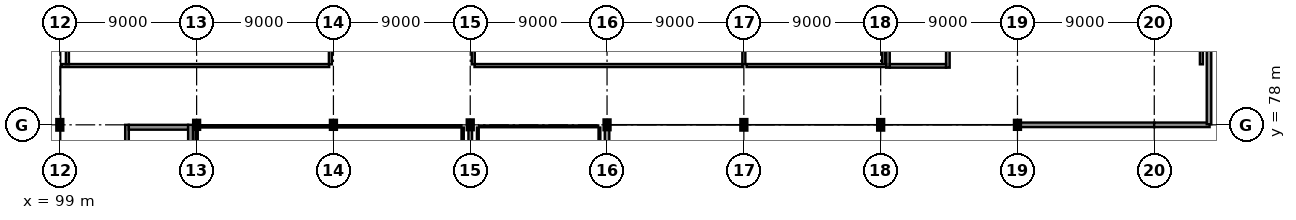
"""IFC4 building model, lengths in metres.
Left out: names, types, materials, properties, quantities, classifications, styles, units other than length and angle.
Written with IfcOpenShell. Run it as: python <this file> out.ifc"""

import sys

from ifc_helpers import new_model, si_unit, direction, frame, frame_2d, origin, origin_2d, place, context, subcontext, project, spatial, rectangle, i_section, extrude, element, fill, save


model = new_model("IFC4")
c1 = context("Model", 3, precision=1e-05, world=origin(), true_north=direction((0.0, 1.0)))
c2 = subcontext(c1, "Body", "Model", "MODEL_VIEW")
j1 = project(units=[si_unit("LENGTHUNIT", "METRE"), si_unit("PLANEANGLEUNIT", "RADIAN")], contexts=[c1])
p1 = place(None, origin())
s1 = spatial("IfcSite", under=j1, at=p1, CompositionType="ELEMENT")
p2 = place(p1, origin())
s2 = spatial("IfcBuilding", under=s1, at=p2, CompositionType="ELEMENT")
p3 = place(p2, frame((0.0, 0.0, 9.9)))
s3 = spatial("IfcBuildingStorey", under=s2, at=p3, CompositionType="ELEMENT", Elevation=9.9)
p4 = place(p3, frame((99.0, 78.0, 0.0), z_axis=(0.0, 0.0, 1.0), x_axis=(1.0, 0.0, 0.0)))
e1 = element("IfcColumn", 1, at=p4, inside=s3, PredefinedType="COLUMN", context=c2, shape_type="SweptSolid", body=[
    extrude(i_section(OverallWidth=0.3, OverallDepth=0.6, WebThickness=0.015, FlangeThickness=0.03, at=origin_2d()), origin(), (0.0, 0.0, 1.0), 4.5),
])
for number, where, z_axis, x_axis in (
    (2, (108.0, 78.0, 0.0), (0.0, 0.0, 1.0), (0.0, 1.0, 0.0)),
    (3, (117.0, 78.0, 0.0), (0.0, 0.0, 1.0), (1.0, 0.0, 0.0)),
):
    element("IfcColumn", number, at=place(p3, frame(where, z_axis=z_axis, x_axis=x_axis)), inside=s3, PredefinedType="COLUMN", context=c2, shape_type="SweptSolid", body=[
        extrude(i_section(OverallWidth=0.3, OverallDepth=0.5, WebThickness=0.014, FlangeThickness=0.028, at=origin_2d()), origin(), (0.0, 0.0, 1.0), 4.5),
    ])
for number, where, z_axis, x_axis in (
    (4, (126.0, 78.0, 0.0), (0.0, 0.0, 1.0), (1.0, 0.0, 0.0)),
    (5, (135.0, 78.0, 0.0), (0.0, 0.0, 1.0), (1.0, 0.0, 0.0)),
):
    element("IfcColumn", number, at=place(p3, frame(where, z_axis=z_axis, x_axis=x_axis)), inside=s3, PredefinedType="COLUMN", context=c2, shape_type="SweptSolid", body=[
        extrude(i_section(OverallWidth=0.3, OverallDepth=0.55, WebThickness=0.015, FlangeThickness=0.029, at=origin_2d()), origin(), (0.0, 0.0, 1.0), 4.5),
    ])
for number, where, z_axis, x_axis in (
    (6, (144.0, 78.0, 0.0), (0.0, 0.0, 1.0), (1.0, 0.0, 0.0)),
    (7, (153.0, 78.0, 0.0), (0.0, 0.0, 1.0), (0.0, 1.0, 0.0)),
):
    element("IfcColumn", number, at=place(p3, frame(where, z_axis=z_axis, x_axis=x_axis)), inside=s3, PredefinedType="COLUMN", context=c2, shape_type="SweptSolid", body=[
        extrude(i_section(OverallWidth=0.3, OverallDepth=0.6, WebThickness=0.015, FlangeThickness=0.03, at=origin_2d()), origin(), (0.0, 0.0, 1.0), 4.5),
    ])
p5 = place(p3, frame((162.0, 78.0, 0.0), z_axis=(0.0, 0.0, 1.0), x_axis=(1.0, 0.0, 0.0)))
e8 = element("IfcColumn", 8, at=p5, inside=s3, PredefinedType="COLUMN", context=c2, shape_type="SweptSolid", body=[
    extrude(i_section(OverallWidth=0.3, OverallDepth=0.5, WebThickness=0.014, FlangeThickness=0.028, at=origin_2d()), origin(), (0.0, 0.0, 1.0), 4.5),
])
p6 = place(p3, frame((135.0, 66.148, 0.0), z_axis=(0.0, 0.0, 1.0), x_axis=(0.0, 1.0, 0.0)))
e9 = element("IfcWall", 9, at=p6, inside=s3, PredefinedType="SOLIDWALL", context=c2, shape_type="SweptSolid", body=[
    extrude(rectangle(XDim=11.579, YDim=0.3, at=frame_2d((5.79, 0.0))), origin(), (0.0, 0.0, 1.0), 3.845),
])
p7 = place(p6, frame((2.242, 0.0, 0.8)))
e10 = element("IfcOpeningElement", 10, at=p7, cuts=e9, PredefinedType="OPENING", context=c2, shape_type="SweptSolid", body=[
    extrude(rectangle(XDim=2.0, YDim=2.0, at=frame_2d((1.0, 1.0))), frame((0.0, 0.165, 0.0), z_axis=(0.0, -1.0, 0.0), x_axis=(1.0, 0.0, 0.0)), (0.0, 0.0, 1.0), 0.33),
])
p8 = place(p6, frame((7.337, 0.0, 0.8)))
e11 = element("IfcOpeningElement", 11, at=p8, cuts=e9, PredefinedType="OPENING", context=c2, shape_type="SweptSolid", body=[
    extrude(rectangle(XDim=2.0, YDim=2.0, at=frame_2d((1.0, 1.0))), frame((0.0, 0.165, 0.0), z_axis=(0.0, -1.0, 0.0), x_axis=(1.0, 0.0, 0.0)), (0.0, 0.0, 1.0), 0.33),
])
p9 = place(p3, frame((162.008, 78.0, 0.0), z_axis=(0.0, 0.0, 1.0), x_axis=(1.0, 0.0, 0.0)))
e12 = element("IfcWall", 12, at=p9, inside=s3, PredefinedType="SOLIDWALL", context=c2, shape_type="SweptSolid", body=[
    extrude(rectangle(XDim=9.002, YDim=0.3, at=frame_2d((4.501, 0.0))), origin(), (0.0, 0.0, 1.0), 3.187),
])
p10 = place(p3, frame((170.99, 78.0, 0.0), z_axis=(0.0, 0.0, 1.0), x_axis=(1.0, 0.0, 0.0)))
e13 = element("IfcWall", 13, at=p10, inside=s3, PredefinedType="SOLIDWALL", context=c2, shape_type="SweptSolid", body=[
    extrude(rectangle(XDim=3.65, YDim=0.3, at=frame_2d((1.825, 0.0))), origin(), (0.0, 0.0, 1.0), 3.187),
])
p11 = place(p3, frame((174.6, 78.04, 0.0), z_axis=(0.0, 0.0, 1.0), x_axis=(0.0, 1.0, 0.0)))
e14 = element("IfcWall", 14, at=p11, inside=s3, PredefinedType="SOLIDWALL", context=c2, shape_type="SweptSolid", body=[
    extrude(rectangle(XDim=18.0, YDim=0.3, at=frame_2d((9.0, 0.0))), origin(), (0.0, 0.0, 1.0), 3.545),
])
p12 = place(p11, frame((4.75, 0.0, 0.9)))
e15 = element("IfcOpeningElement", 15, at=p12, cuts=e14, PredefinedType="OPENING", context=c2, shape_type="SweptSolid", body=[
    extrude(rectangle(XDim=1.3, YDim=1.3, at=frame_2d((0.65, 0.65))), frame((0.0, 0.165, 0.0), z_axis=(0.0, -1.0, 0.0), x_axis=(1.0, 0.0, 0.0)), (0.0, 0.0, 1.0), 0.33),
])
p13 = place(p11, frame((11.95, 0.0, 0.9)))
e16 = element("IfcOpeningElement", 16, at=p13, cuts=e14, PredefinedType="OPENING", context=c2, shape_type="SweptSolid", body=[
    extrude(rectangle(XDim=1.3, YDim=1.3, at=frame_2d((0.65, 0.65))), frame((0.0, 0.165, 0.0), z_axis=(0.0, -1.0, 0.0), x_axis=(1.0, 0.0, 0.0)), (0.0, 0.0, 1.0), 0.33),
])
p14 = place(p3, frame((153.48, 81.76, 0.0), z_axis=(0.0, 0.0, 1.0), x_axis=(0.0, 1.0, 0.0)))
e17 = element("IfcWall", 17, at=p14, inside=s3, PredefinedType="SHEAR", context=c2, shape_type="SweptSolid", body=[
    extrude(rectangle(XDim=8.28, YDim=0.24, at=frame_2d((4.14, 0.0))), origin(), (0.0, 0.0, 1.0), 4.31),
])
p15 = place(p3, frame((157.42, 81.76, 0.0), z_axis=(0.0, 0.0, 1.0), x_axis=(0.0, 1.0, 0.0)))
e18 = element("IfcWall", 18, at=p15, inside=s3, PredefinedType="SHEAR", context=c2, shape_type="SweptSolid", body=[
    extrude(rectangle(XDim=8.28, YDim=0.24, at=frame_2d((4.14, 0.0))), origin(), (0.0, 0.0, 1.0), 4.31),
])
p16 = place(p15, frame((0.49, 0.0, 0.0)))
e19 = element("IfcOpeningElement", 19, at=p16, cuts=e18, PredefinedType="OPENING", context=c2, shape_type="SweptSolid", body=[
    extrude(rectangle(XDim=1.3, YDim=2.2, at=frame_2d((0.65, 1.1))), frame((0.0, 0.135, 0.0), z_axis=(0.0, -1.0, 0.0), x_axis=(1.0, 0.0, 0.0)), (0.0, 0.0, 1.0), 0.27),
])
p17 = place(p3, frame((153.6, 81.88, 0.0), z_axis=(0.0, 0.0, 1.0), x_axis=(1.0, 0.0, 0.0)))
e20 = element("IfcWall", 20, at=p17, inside=s3, PredefinedType="SHEAR", context=c2, shape_type="SweptSolid", body=[
    extrude(rectangle(XDim=3.7, YDim=0.24, at=frame_2d((1.85, 0.0))), origin(), (0.0, 0.0, 1.0), 4.31),
])
p18 = place(p3, frame((103.42, 75.24, 0.0), z_axis=(0.0, 0.0, 1.0), x_axis=(0.0, 1.0, 0.0)))
e21 = element("IfcWall", 21, at=p18, inside=s3, PredefinedType="SHEAR", context=c2, shape_type="SweptSolid", body=[
    extrude(rectangle(XDim=2.76, YDim=0.24, at=frame_2d((1.38, 0.0))), origin(), (0.0, 0.0, 1.0), 4.16),
])
p19 = place(p3, frame((103.54, 77.84, 0.0), z_axis=(0.0, 0.0, 1.0), x_axis=(1.0, 0.0, 0.0)))
e22 = element("IfcWall", 22, at=p19, inside=s3, PredefinedType="SHEAR", context=c2, shape_type="SweptSolid", body=[
    extrude(rectangle(XDim=3.9, YDim=0.32, at=frame_2d((1.95, 0.0))), origin(), (0.0, 0.0, 1.0), 4.16),
])
p20 = place(p19, frame((1.225, 0.0, 0.0)))
e23 = element("IfcOpeningElement", 23, at=p20, cuts=e22, PredefinedType="OPENING", context=c2, shape_type="SweptSolid", body=[
    extrude(rectangle(XDim=1.45, YDim=2.2, at=frame_2d((0.725, 1.1))), frame((0.0, 0.175, 0.0), z_axis=(0.0, -1.0, 0.0), x_axis=(1.0, 0.0, 0.0)), (0.0, 0.0, 1.0), 0.35),
])
p21 = place(p3, frame((107.6, 68.96, 0.0), z_axis=(0.0, 0.0, 1.0), x_axis=(0.0, 1.0, 0.0)))
e24 = element("IfcWall", 24, at=p21, inside=s3, PredefinedType="SHEAR", context=c2, shape_type="SweptSolid", body=[
    extrude(rectangle(XDim=9.04, YDim=0.32, at=frame_2d((4.52, 0.0))), origin(), (0.0, 0.0, 1.0), 4.16),
])
p22 = place(p3, frame((126.0, 66.008, 0.0), z_axis=(0.0, 0.0, 1.0), x_axis=(0.0, 1.0, 0.0)))
e25 = element("IfcWall", 25, at=p22, inside=s3, PredefinedType="SHEAR", context=c2, shape_type="SweptSolid", body=[
    extrude(rectangle(XDim=11.719, YDim=0.24, at=frame_2d((5.859, 0.0))), origin(), (0.0, 0.0, 1.0), 3.595),
])
p23 = place(p3, frame((116.72, 81.9, 0.0), z_axis=(0.0, 0.0, 1.0), x_axis=(-1.0, 0.0, 0.0)))
e26 = element("IfcWall", 26, at=p23, inside=s3, PredefinedType="PARTITIONING", context=c2, shape_type="SweptSolid", body=[
    extrude(rectangle(XDim=17.595, YDim=0.2, at=frame_2d((8.797, 0.0))), origin(), (0.0, 0.0, 1.0), 4.14),
])
p24 = place(p23, frame((7.797, 0.0, 0.0)))
e27 = element("IfcOpeningElement", 27, at=p24, cuts=e26, PredefinedType="OPENING", context=c2, shape_type="SweptSolid", body=[
    extrude(rectangle(XDim=2.0, YDim=2.6, at=frame_2d((1.0, 1.3))), frame((0.0, 0.115, 0.0), z_axis=(0.0, -1.0, 0.0), x_axis=(1.0, 0.0, 0.0)), (0.0, 0.0, 1.0), 0.23),
])
p25 = place(p3, frame((99.5, 81.98, 0.0), z_axis=(0.0, 0.0, 1.0), x_axis=(0.0, 1.0, 0.0)))
e28 = element("IfcWall", 28, at=p25, inside=s3, PredefinedType="PARTITIONING", context=c2, shape_type="SweptSolid", body=[
    extrude(rectangle(XDim=13.875, YDim=0.2, at=frame_2d((6.938, 0.0))), origin(), (0.0, 0.0, 1.0), 4.14),
])
p26 = place(p3, frame((116.8, 95.752, 0.0), z_axis=(0.0, 0.0, 1.0), x_axis=(0.0, -1.0, 0.0)))
e29 = element("IfcWall", 29, at=p26, inside=s3, PredefinedType="PARTITIONING", context=c2, shape_type="SweptSolid", body=[
    extrude(rectangle(XDim=13.772, YDim=0.2, at=frame_2d((6.886, 0.0))), origin(), (0.0, 0.0, 1.0), 3.495),
])
p27 = place(p3, frame((126.2, 81.98, 0.0), z_axis=(0.0, 0.0, 1.0), x_axis=(0.0, 1.0, 0.0)))
e30 = element("IfcWall", 30, at=p27, inside=s3, PredefinedType="PARTITIONING", context=c2, shape_type="SweptSolid", body=[
    extrude(rectangle(XDim=13.44, YDim=0.2, at=frame_2d((6.72, 0.0))), origin(), (0.0, 0.0, 1.0), 3.505),
])
p28 = place(p3, frame((144.0, 95.42, 0.0), z_axis=(0.0, 0.0, 1.0), x_axis=(0.0, -1.0, 0.0)))
e31 = element("IfcWall", 31, at=p28, inside=s3, PredefinedType="PARTITIONING", context=c2, shape_type="SweptSolid", body=[
    extrude(rectangle(XDim=13.44, YDim=0.2, at=frame_2d((6.72, 0.0))), origin(), (0.0, 0.0, 1.0), 3.395),
])
p29 = place(p3, frame((143.92, 81.9, 0.0), z_axis=(0.0, 0.0, 1.0), x_axis=(-1.0, 0.0, 0.0)))
e32 = element("IfcWall", 32, at=p29, inside=s3, PredefinedType="PARTITIONING", context=c2, shape_type="SweptSolid", body=[
    extrude(rectangle(XDim=17.64, YDim=0.2, at=frame_2d((8.82, 0.0))), origin(), (0.0, 0.0, 1.0), 4.14),
])
p30 = place(p29, frame((7.87, 0.0, 0.0)))
e33 = element("IfcOpeningElement", 33, at=p30, cuts=e32, PredefinedType="OPENING", context=c2, shape_type="SweptSolid", body=[
    extrude(rectangle(XDim=1.9, YDim=2.5, at=frame_2d((0.95, 1.25))), frame((0.0, 0.115, 0.0), z_axis=(0.0, -1.0, 0.0), x_axis=(1.0, 0.0, 0.0)), (0.0, 0.0, 1.0), 0.23),
])
p31 = place(p3, frame((153.2, 95.702, 0.0), z_axis=(0.0, 0.0, 1.0), x_axis=(0.0, -1.0, 0.0)))
e34 = element("IfcWall", 34, at=p31, inside=s3, PredefinedType="PARTITIONING", context=c2, shape_type="SweptSolid", body=[
    extrude(rectangle(XDim=13.722, YDim=0.2, at=frame_2d((6.861, 0.0))), origin(), (0.0, 0.0, 1.0), 3.545),
])
p32 = place(p3, frame((153.365, 81.9, 0.0), z_axis=(0.0, 0.0, 1.0), x_axis=(-1.0, 0.0, 0.0)))
e35 = element("IfcWall", 35, at=p32, inside=s3, PredefinedType="PARTITIONING", context=c2, shape_type="SweptSolid", body=[
    extrude(rectangle(XDim=9.185, YDim=0.2, at=frame_2d((4.593, 0.0))), origin(), (0.0, 0.0, 1.0), 4.14),
])
p33 = place(p32, frame((3.693, 0.0, 0.0)))
e36 = element("IfcOpeningElement", 36, at=p33, cuts=e35, PredefinedType="OPENING", context=c2, shape_type="SweptSolid", body=[
    extrude(rectangle(XDim=1.8, YDim=2.45, at=frame_2d((0.9, 1.225))), frame((0.0, 0.115, 0.0), z_axis=(0.0, -1.0, 0.0), x_axis=(1.0, 0.0, 0.0)), (0.0, 0.0, 1.0), 0.23),
])
p34 = place(p3, frame((174.1, 95.855, 0.0), z_axis=(0.0, 0.0, 1.0), x_axis=(0.0, -1.0, 0.0)))
e37 = element("IfcWall", 37, at=p34, inside=s3, PredefinedType="PARTITIONING", context=c2, shape_type="SweptSolid", body=[
    extrude(rectangle(XDim=13.875, YDim=0.2, at=frame_2d((6.938, 0.0))), origin(), (0.0, 0.0, 1.0), 4.14),
])
p35 = place(p3, frame((108.0, 66.48, 0.0), z_axis=(0.0, 0.0, 1.0), x_axis=(0.0, 1.0, 0.0)))
e38 = element("IfcWall", 38, at=p35, inside=s3, PredefinedType="PARTITIONING", context=c2, shape_type="SweptSolid", body=[
    extrude(rectangle(XDim=11.34, YDim=0.15, at=frame_2d((5.67, 0.0))), origin(), (0.0, 0.0, 1.0), 3.705),
])
p36 = place(p3, frame((107.848, 77.9, 0.0), z_axis=(0.0, 0.0, 1.0), x_axis=(1.0, 0.0, 0.0)))
e39 = element("IfcWall", 39, at=p36, inside=s3, PredefinedType="PARTITIONING", context=c2, shape_type="SweptSolid", body=[
    extrude(rectangle(XDim=17.572, YDim=0.15, at=frame_2d((8.786, 0.0))), origin(), (0.0, 0.0, 1.0), 3.705),
])
p37 = place(p36, frame((7.558, 0.0, 0.0)))
e40 = element("IfcOpeningElement", 40, at=p37, cuts=e39, PredefinedType="OPENING", context=c2, shape_type="SweptSolid", body=[
    extrude(rectangle(XDim=1.05, YDim=2.25, at=frame_2d((0.525, 1.125))), frame((0.0, 0.09, 0.0), z_axis=(0.0, -1.0, 0.0), x_axis=(1.0, 0.0, 0.0)), (0.0, 0.0, 1.0), 0.18),
])
p38 = place(p3, frame((125.5, 77.82, 0.0), z_axis=(0.0, 0.0, 1.0), x_axis=(0.0, -1.0, 0.0)))
e41 = element("IfcWall", 41, at=p38, inside=s3, PredefinedType="PARTITIONING", context=c2, shape_type="SweptSolid", body=[
    extrude(rectangle(XDim=11.34, YDim=0.15, at=frame_2d((5.67, 0.0))), origin(), (0.0, 0.0, 1.0), 4.14),
])
p39 = place(p3, frame((126.5, 66.075, 0.0), z_axis=(0.0, 0.0, 1.0), x_axis=(0.0, 1.0, 0.0)))
e42 = element("IfcWall", 42, at=p39, inside=s3, PredefinedType="PARTITIONING", context=c2, shape_type="SweptSolid", body=[
    extrude(rectangle(XDim=11.745, YDim=0.12, at=frame_2d((5.873, 0.0))), origin(), (0.0, 0.0, 1.0), 4.14),
])
p40 = place(p3, frame((126.58, 77.9, 0.0), z_axis=(0.0, 0.0, 1.0), x_axis=(1.0, 0.0, 0.0)))
e43 = element("IfcWall", 43, at=p40, inside=s3, PredefinedType="PARTITIONING", context=c2, shape_type="SweptSolid", body=[
    extrude(rectangle(XDim=7.84, YDim=0.12, at=frame_2d((3.92, 0.0))), origin(), (0.0, 0.0, 1.0), 3.705),
])
p41 = place(p40, frame((3.445, 0.0, 0.0)))
e44 = element("IfcOpeningElement", 44, at=p41, cuts=e43, PredefinedType="OPENING", context=c2, shape_type="SweptSolid", body=[
    extrude(rectangle(XDim=0.95, YDim=2.15, at=frame_2d((0.475, 1.075))), frame((0.0, 0.075, 0.0), z_axis=(0.0, -1.0, 0.0), x_axis=(1.0, 0.0, 0.0)), (0.0, 0.0, 1.0), 0.15),
])
p42 = place(p3, frame((134.5, 77.82, 0.0), z_axis=(0.0, 0.0, 1.0), x_axis=(0.0, -1.0, 0.0)))
e45 = element("IfcWall", 45, at=p42, inside=s3, PredefinedType="PARTITIONING", context=c2, shape_type="SweptSolid", body=[
    extrude(rectangle(XDim=11.745, YDim=0.12, at=frame_2d((5.873, 0.0))), origin(), (0.0, 0.0, 1.0), 4.14),
])
p43 = place(p12, origin())
e46 = element("IfcWindow", 46, at=p43, inside=s3, PartitioningType="SINGLE_PANEL", PredefinedType="WINDOW", context=c2, shape_type="SweptSolid", body=[
    extrude(rectangle(XDim=1.3, YDim=1.3, at=frame_2d((0.65, 0.65))), frame((0.0, 0.03, 0.0), z_axis=(0.0, -1.0, 0.0), x_axis=(1.0, 0.0, 0.0)), (0.0, 0.0, 1.0), 0.06),
])
fill(e15, e46)
p44 = place(p16, frame((1.3, 0.0, 0.0), z_axis=(0.0, 0.0, 1.0), x_axis=(-1.0, 0.0, 0.0)))
e47 = element("IfcDoor", 47, at=p44, inside=s3, OperationType="SINGLE_SWING_LEFT", PredefinedType="DOOR", context=c2, shape_type="SweptSolid", body=[
    extrude(rectangle(XDim=1.3, YDim=2.2, at=frame_2d((0.65, 1.1))), frame((0.0, 0.025, 0.0), z_axis=(0.0, -1.0, 0.0), x_axis=(1.0, 0.0, 0.0)), (0.0, 0.0, 1.0), 0.05),
])
fill(e19, e47)
p45 = place(p20, origin())
e48 = element("IfcDoor", 48, at=p45, inside=s3, OperationType="DOUBLE_DOOR_SINGLE_SWING", PredefinedType="DOOR", context=c2, shape_type="SweptSolid", body=[
    extrude(rectangle(XDim=1.45, YDim=2.2, at=frame_2d((0.725, 1.1))), frame((0.0, 0.025, 0.0), z_axis=(0.0, -1.0, 0.0), x_axis=(1.0, 0.0, 0.0)), (0.0, 0.0, 1.0), 0.05),
])
fill(e23, e48)
p46 = place(p24, origin())
e49 = element("IfcDoor", 49, at=p46, inside=s3, OperationType="DOUBLE_DOOR_SINGLE_SWING", PredefinedType="DOOR", context=c2, shape_type="SweptSolid", body=[
    extrude(rectangle(XDim=2.0, YDim=2.6, at=frame_2d((1.0, 1.3))), frame((0.0, 0.025, 0.0), z_axis=(0.0, -1.0, 0.0), x_axis=(1.0, 0.0, 0.0)), (0.0, 0.0, 1.0), 0.05),
])
fill(e27, e49)
p47 = place(p30, frame((1.9, 0.0, 0.0), z_axis=(0.0, 0.0, 1.0), x_axis=(-1.0, 0.0, 0.0)))
e50 = element("IfcDoor", 50, at=p47, inside=s3, OperationType="DOUBLE_DOOR_SINGLE_SWING", PredefinedType="DOOR", context=c2, shape_type="SweptSolid", body=[
    extrude(rectangle(XDim=1.9, YDim=2.5, at=frame_2d((0.95, 1.25))), frame((0.0, 0.025, 0.0), z_axis=(0.0, -1.0, 0.0), x_axis=(1.0, 0.0, 0.0)), (0.0, 0.0, 1.0), 0.05),
])
fill(e33, e50)
p48 = place(p33, origin())
e51 = element("IfcDoor", 51, at=p48, inside=s3, OperationType="DOUBLE_DOOR_SINGLE_SWING", PredefinedType="DOOR", context=c2, shape_type="SweptSolid", body=[
    extrude(rectangle(XDim=1.8, YDim=2.45, at=frame_2d((0.9, 1.225))), frame((0.0, 0.025, 0.0), z_axis=(0.0, -1.0, 0.0), x_axis=(1.0, 0.0, 0.0)), (0.0, 0.0, 1.0), 0.05),
])
fill(e36, e51)
p49 = place(p37, frame((1.05, 0.0, 0.0), z_axis=(0.0, 0.0, 1.0), x_axis=(-1.0, 0.0, 0.0)))
e52 = element("IfcDoor", 52, at=p49, inside=s3, OperationType="SINGLE_SWING_LEFT", PredefinedType="DOOR", context=c2, shape_type="SweptSolid", body=[
    extrude(rectangle(XDim=1.05, YDim=2.25, at=frame_2d((0.525, 1.125))), frame((0.0, 0.025, 0.0), z_axis=(0.0, -1.0, 0.0), x_axis=(1.0, 0.0, 0.0)), (0.0, 0.0, 1.0), 0.05),
])
fill(e40, e52)
p50 = place(p41, origin())
e53 = element("IfcDoor", 53, at=p50, inside=s3, OperationType="SINGLE_SWING_RIGHT", PredefinedType="DOOR", context=c2, shape_type="SweptSolid", body=[
    extrude(rectangle(XDim=0.95, YDim=2.15, at=frame_2d((0.475, 1.075))), frame((0.0, 0.025, 0.0), z_axis=(0.0, -1.0, 0.0), x_axis=(1.0, 0.0, 0.0)), (0.0, 0.0, 1.0), 0.05),
])
fill(e44, e53)
save(model, sys.argv[1])
